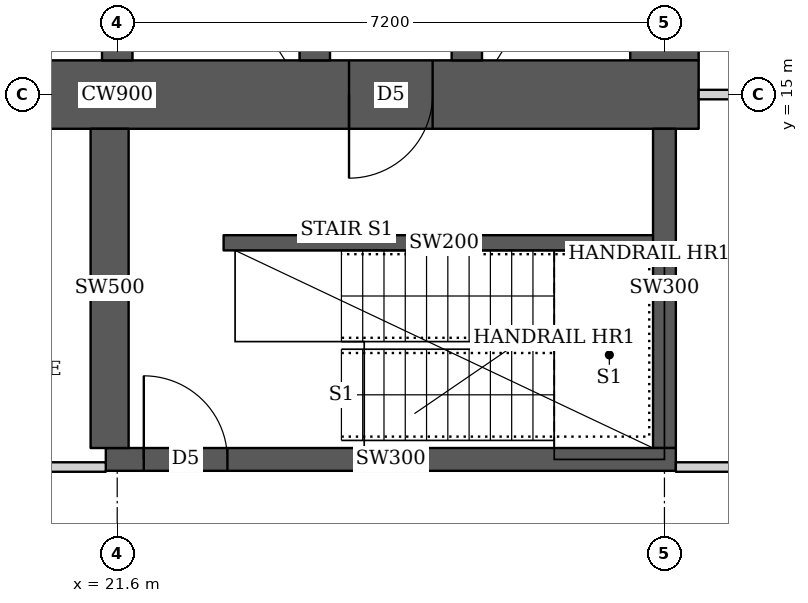
"""IFC4 building model, lengths in metres.
Left out: names, types, materials, properties, quantities, classifications, styles, units other than length and angle.
Written with IfcOpenShell. Run it as: python <this file> out.ifc"""

import sys

from ifc_helpers import new_model, si_unit, direction, frame, frame_2d, origin, place, context, subcontext, project, spatial, rectangle, extrude, element, fill, save


model = new_model("IFC4")
c1 = context("Model", 3, precision=1e-05, world=origin(), true_north=direction((0.0, 1.0)))
c2 = subcontext(c1, "Body", "Model", "MODEL_VIEW")
j1 = project(units=[si_unit("LENGTHUNIT", "METRE"), si_unit("PLANEANGLEUNIT", "RADIAN")], contexts=[c1])
p1 = place(None, origin())
s1 = spatial("IfcSite", under=j1, at=p1, CompositionType="ELEMENT")
p2 = place(p1, origin())
s2 = spatial("IfcBuilding", under=s1, at=p2, CompositionType="ELEMENT")
p3 = place(p2, frame((0.0, 0.0, 77.9)))
s3 = spatial("IfcBuildingStorey", under=s2, at=p3, CompositionType="ELEMENT", Elevation=77.9)
p4 = place(p3, frame((13.95, 15.0, 0.0), z_axis=(0.0, 0.0, 1.0), x_axis=(1.0, 0.0, 0.0)))
e1 = element("IfcWall", 1, at=p4, inside=s3, PredefinedType="SHEAR", context=c2, shape_type="SweptSolid", body=[
    extrude(rectangle(XDim=15.3, YDim=0.9, at=frame_2d((7.65, 0.0))), origin(), (0.0, 0.0, 1.0), 3.75),
])
p5 = place(p4, frame((4.45, 0.0, 0.0)))
e2 = element("IfcOpeningElement", 2, at=p5, cuts=e1, PredefinedType="OPENING", context=c2, shape_type="SweptSolid", body=[
    extrude(rectangle(XDim=1.8, YDim=2.1, at=frame_2d((0.9, 1.05))), frame((0.0, 0.46, 0.0), z_axis=(0.0, -1.0, 0.0), x_axis=(1.0, 0.0, 0.0)), (0.0, 0.0, 1.0), 0.92),
])
p6 = place(p4, frame((10.7, 0.0, 0.0)))
e3 = element("IfcOpeningElement", 3, at=p6, cuts=e1, PredefinedType="OPENING", context=c2, shape_type="SweptSolid", body=[
    extrude(rectangle(XDim=1.1, YDim=2.1, at=frame_2d((0.55, 1.05))), frame((0.0, 0.46, 0.0), z_axis=(0.0, -1.0, 0.0), x_axis=(1.0, 0.0, 0.0)), (0.0, 0.0, 1.0), 0.92),
])
p7 = place(p3, frame((28.8, 15.45, 0.0), z_axis=(0.0, 0.0, 1.0), x_axis=(0.0, 1.0, 0.0)))
e4 = element("IfcWall", 4, at=p7, inside=s3, PredefinedType="SHEAR", context=c2, shape_type="SweptSolid", body=[
    extrude(rectangle(XDim=14.1, YDim=0.9, at=frame_2d((7.05, 0.0))), origin(), (0.0, 0.0, 1.0), 3.75),
])
for number, where, z_axis, x_axis in (
    (5, (21.6, 15.45, 0.0), (0.0, 0.0, 1.0), (0.0, 1.0, 0.0)),
    (6, (24.2, 15.45, 0.0), (0.0, 0.0, 1.0), (0.0, 1.0, 0.0)),
):
    element("IfcWall", number, at=place(p3, frame(where, z_axis=z_axis, x_axis=x_axis)), inside=s3, PredefinedType="SHEAR", context=c2, shape_type="SweptSolid", body=[
        extrude(rectangle(XDim=14.1, YDim=0.4, at=frame_2d((7.05, 0.0))), origin(), (0.0, 0.0, 1.0), 3.75),
    ])
p8 = place(p3, frame((26.2, 15.45, 0.0), z_axis=(0.0, 0.0, 1.0), x_axis=(0.0, 1.0, 0.0)))
e7 = element("IfcWall", 7, at=p8, inside=s3, PredefinedType="SHEAR", context=c2, shape_type="SweptSolid", body=[
    extrude(rectangle(XDim=3.1, YDim=0.4, at=frame_2d((1.55, 0.0))), origin(), (0.0, 0.0, 1.0), 3.75),
])
p9 = place(p8, frame((0.825, 0.0, 0.0)))
e8 = element("IfcOpeningElement", 8, at=p9, cuts=e7, PredefinedType="OPENING", context=c2, shape_type="SweptSolid", body=[
    extrude(rectangle(XDim=1.2, YDim=2.1, at=frame_2d((0.6, 1.05))), frame((0.0, 0.21, 0.0), z_axis=(0.0, -1.0, 0.0), x_axis=(1.0, 0.0, 0.0)), (0.0, 0.0, 1.0), 0.42),
])
p10 = place(p3, frame((21.45, 10.2, 0.0), z_axis=(0.0, 0.0, 1.0), x_axis=(1.0, 0.0, 0.0)))
e9 = element("IfcWall", 9, at=p10, inside=s3, PredefinedType="SHEAR", context=c2, shape_type="SweptSolid", body=[
    extrude(rectangle(XDim=7.5, YDim=0.3, at=frame_2d((3.75, 0.0))), origin(), (0.0, 0.0, 1.0), 3.75),
])
p11 = place(p10, frame((0.5, 0.0, 0.0)))
e10 = element("IfcOpeningElement", 10, at=p11, cuts=e9, PredefinedType="OPENING", context=c2, shape_type="SweptSolid", body=[
    extrude(rectangle(XDim=1.1, YDim=2.1, at=frame_2d((0.55, 1.05))), frame((0.0, 0.16, 0.0), z_axis=(0.0, -1.0, 0.0), x_axis=(1.0, 0.0, 0.0)), (0.0, 0.0, 1.0), 0.32),
])
p12 = place(p3, frame((21.5, 10.35, 0.0), z_axis=(0.0, 0.0, 1.0), x_axis=(0.0, 1.0, 0.0)))
e11 = element("IfcWall", 11, at=p12, inside=s3, PredefinedType="SHEAR", context=c2, shape_type="SweptSolid", body=[
    extrude(rectangle(XDim=4.2, YDim=0.5, at=frame_2d((2.1, 0.0))), origin(), (0.0, 0.0, 1.0), 3.75),
])
p13 = place(p3, frame((28.8, 10.35, 0.0), z_axis=(0.0, 0.0, 1.0), x_axis=(0.0, 1.0, 0.0)))
e12 = element("IfcWall", 12, at=p13, inside=s3, PredefinedType="SHEAR", context=c2, shape_type="SweptSolid", body=[
    extrude(rectangle(XDim=4.2, YDim=0.3, at=frame_2d((2.1, 0.0))), origin(), (0.0, 0.0, 1.0), 3.75),
])
p14 = place(p3, frame((10.163, 10.1, 0.0), z_axis=(0.0, 0.0, 1.0), x_axis=(1.0, 0.0, 0.0)))
e13 = element("IfcWall", 13, at=p14, inside=s3, PredefinedType="PARTITIONING", context=c2, shape_type="SweptSolid", body=[
    extrude(rectangle(XDim=11.287, YDim=0.125, at=frame_2d((5.644, 0.0))), origin(), (0.0, 0.0, 1.0), 3.5),
])
p15 = place(p14, frame((7.832, 0.0, 0.0)))
e14 = element("IfcOpeningElement", 14, at=p15, cuts=e13, PredefinedType="OPENING", context=c2, shape_type="SweptSolid", body=[
    extrude(rectangle(XDim=1.8, YDim=2.1, at=frame_2d((0.9, 1.05))), frame((0.0, 0.073, 0.0), z_axis=(0.0, -1.0, 0.0), x_axis=(1.0, 0.0, 0.0)), (0.0, 0.0, 1.0), 0.145),
])
p16 = place(p3, frame((28.95, 10.1, 0.0), z_axis=(0.0, 0.0, 1.0), x_axis=(1.0, 0.0, 0.0)))
e15 = element("IfcWall", 15, at=p16, inside=s3, PredefinedType="PARTITIONING", context=c2, shape_type="SweptSolid", body=[
    extrude(rectangle(XDim=9.188, YDim=0.125, at=frame_2d((4.594, 0.0))), origin(), (0.0, 0.0, 1.0), 3.5),
])
p17 = place(p3, frame((29.25, 15.0, 0.0), z_axis=(0.0, 0.0, 1.0), x_axis=(1.0, 0.0, 0.0)))
e16 = element("IfcWall", 16, at=p17, inside=s3, PredefinedType="PARTITIONING", context=c2, shape_type="SweptSolid", body=[
    extrude(rectangle(XDim=5.949, YDim=0.125, at=frame_2d((2.975, 0.0))), origin(), (0.0, 0.0, 1.0), 3.5),
])
p18 = place(p3, frame((23.0, 13.05, 0.0), z_axis=(0.0, 0.0, 1.0), x_axis=(1.0, 0.0, 0.0)))
e17 = element("IfcWall", 17, at=p18, inside=s3, PredefinedType="SHEAR", context=c2, shape_type="SweptSolid", body=[
    extrude(rectangle(XDim=5.8, YDim=0.2, at=frame_2d((2.9, 0.0))), origin(), (0.0, 0.0, 1.0), 3.75),
])
p19 = place(p6, origin())
e18 = element("IfcDoor", 18, at=p19, inside=s3, OperationType="SINGLE_SWING_RIGHT", PredefinedType="DOOR", context=c2, shape_type="SweptSolid", body=[
    extrude(rectangle(XDim=1.1, YDim=2.1, at=frame_2d((0.55, 1.05))), frame((0.0, 0.025, 0.0), z_axis=(0.0, -1.0, 0.0), x_axis=(1.0, 0.0, 0.0)), (0.0, 0.0, 1.0), 0.05),
])
fill(e3, e18)
p20 = place(p11, origin())
e19 = element("IfcDoor", 19, at=p20, inside=s3, OperationType="SINGLE_SWING_LEFT", PredefinedType="DOOR", context=c2, shape_type="SweptSolid", body=[
    extrude(rectangle(XDim=1.1, YDim=2.1, at=frame_2d((0.55, 1.05))), frame((0.0, 0.025, 0.0), z_axis=(0.0, -1.0, 0.0), x_axis=(1.0, 0.0, 0.0)), (0.0, 0.0, 1.0), 0.05),
])
fill(e10, e19)
save(model, sys.argv[1])
